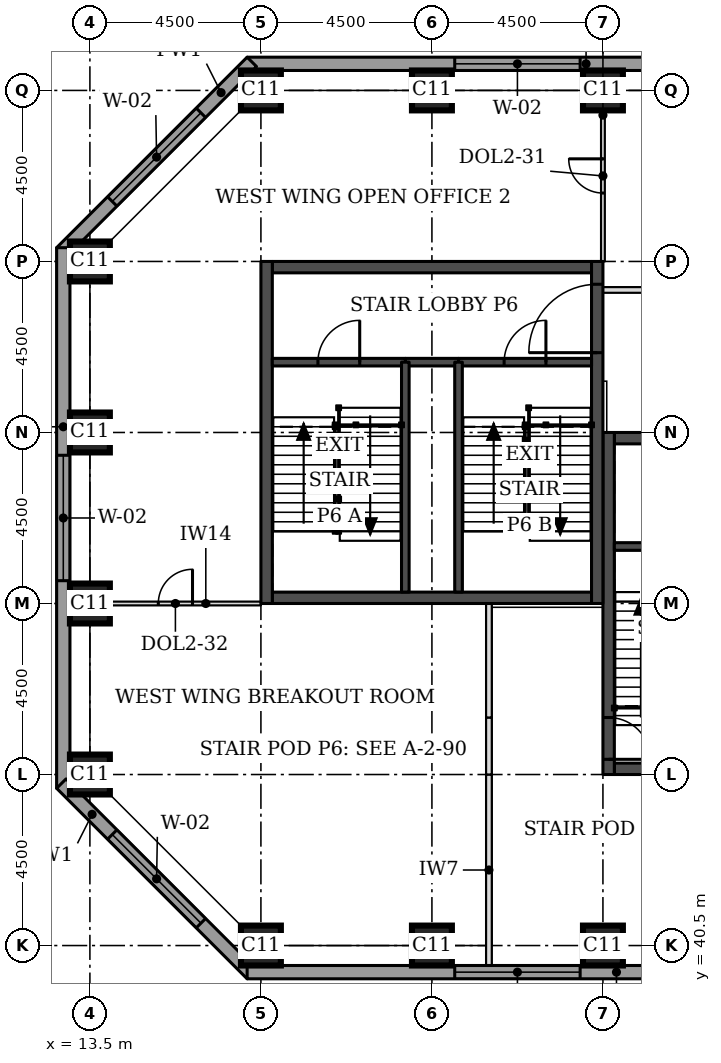
"""IFC4 building model, lengths in metres.
Left out: names, types, materials, properties, quantities, classifications, styles, units other than length and angle.
Written with IfcOpenShell. Run it as: python <this file> out.ifc"""

import sys

from ifc_helpers import new_model, si_unit, direction, frame, frame_2d, origin, origin_2d, place, context, subcontext, project, spatial, rectangle, extrude, element, fill, save


model = new_model("IFC4")
c1 = context("Model", 3, precision=1e-05, world=origin(), true_north=direction((0.0, 1.0)))
c2 = subcontext(c1, "Body", "Model", "MODEL_VIEW")
j1 = project(units=[si_unit("LENGTHUNIT", "METRE"), si_unit("PLANEANGLEUNIT", "RADIAN")], contexts=[c1])
p1 = place(None, origin())
s1 = spatial("IfcSite", under=j1, at=p1, CompositionType="ELEMENT")
p2 = place(p1, origin())
s2 = spatial("IfcBuilding", under=s1, at=p2, CompositionType="ELEMENT")
p3 = place(p2, frame((0.0, 0.0, 86.3)))
s3 = spatial("IfcBuildingStorey", under=s2, at=p3, CompositionType="ELEMENT", Elevation=86.3)
for number, where, z_axis, x_axis in (
    (1, (18.0, 40.5, 0.0), (0.0, 0.0, 1.0), (1.0, 0.0, 0.0)),
    (2, (22.5, 40.5, 0.0), (0.0, 0.0, 1.0), (1.0, 0.0, 0.0)),
    (3, (27.0, 40.5, 0.0), (0.0, 0.0, 1.0), (1.0, 0.0, 0.0)),
    (4, (13.5, 45.0, 0.0), (0.0, 0.0, 1.0), (1.0, 0.0, 0.0)),
    (5, (13.5, 49.5, 0.0), (0.0, 0.0, 1.0), (1.0, 0.0, 0.0)),
    (6, (13.5, 54.0, 0.0), (0.0, 0.0, 1.0), (1.0, 0.0, 0.0)),
    (7, (13.5, 58.5, 0.0), (0.0, 0.0, 1.0), (1.0, 0.0, 0.0)),
    (8, (18.0, 63.0, 0.0), (0.0, 0.0, 1.0), (1.0, 0.0, 0.0)),
    (9, (22.5, 63.0, 0.0), (0.0, 0.0, 1.0), (1.0, 0.0, 0.0)),
    (10, (27.0, 63.0, 0.0), (0.0, 0.0, 1.0), (1.0, 0.0, 0.0)),
):
    element("IfcColumn", number, at=place(p3, frame(where, z_axis=z_axis, x_axis=x_axis)), inside=s3, PredefinedType="COLUMN", context=c2, shape_type="SweptSolid", body=[
        extrude(rectangle(XDim=1.05, YDim=1.05, at=origin_2d()), origin(), (0.0, 0.0, 1.0), 3.7),
    ])
p4 = place(p3, frame((27.3, 45.15, 0.0), z_axis=(0.0, 0.0, 1.0), x_axis=(1.0, 0.0, 0.0)))
e11 = element("IfcWall", 11, at=p4, inside=s3, PredefinedType="SHEAR", context=c2, shape_type="SweptSolid", body=[
    extrude(rectangle(XDim=8.4, YDim=0.3, at=frame_2d((4.2, 0.0))), origin(), (0.0, 0.0, 1.0), 3.7),
])
p5 = place(p4, frame((5.2, 0.0, 0.0)))
e12 = element("IfcOpeningElement", 12, at=p5, cuts=e11, PredefinedType="OPENING", context=c2, shape_type="SweptSolid", body=[
    extrude(rectangle(XDim=1.0, YDim=2.1, at=frame_2d((0.5, 1.05))), frame((0.0, 0.16, 0.0), z_axis=(0.0, -1.0, 0.0), x_axis=(1.0, 0.0, 0.0)), (0.0, 0.0, 1.0), 0.32),
])
p6 = place(p3, frame((27.3, 53.85, 0.0), z_axis=(0.0, 0.0, 1.0), x_axis=(1.0, 0.0, 0.0)))
e13 = element("IfcWall", 13, at=p6, inside=s3, PredefinedType="SHEAR", context=c2, shape_type="SweptSolid", body=[
    extrude(rectangle(XDim=8.4, YDim=0.3, at=frame_2d((4.2, 0.0))), origin(), (0.0, 0.0, 1.0), 3.7),
])
p7 = place(p6, frame((6.4, 0.0, 0.0)))
e14 = element("IfcOpeningElement", 14, at=p7, cuts=e13, PredefinedType="OPENING", context=c2, shape_type="SweptSolid", body=[
    extrude(rectangle(XDim=1.1, YDim=2.1, at=frame_2d((0.55, 1.05))), frame((0.0, 0.16, 0.0), z_axis=(0.0, -1.0, 0.0), x_axis=(1.0, 0.0, 0.0)), (0.0, 0.0, 1.0), 0.32),
])
p8 = place(p3, frame((27.15, 45.0, 0.0), z_axis=(0.0, 0.0, 1.0), x_axis=(0.0, 1.0, 0.0)))
e15 = element("IfcWall", 15, at=p8, inside=s3, PredefinedType="SHEAR", context=c2, shape_type="SweptSolid", body=[
    extrude(rectangle(XDim=9.0, YDim=0.3, at=frame_2d((4.5, 0.0))), origin(), (0.0, 0.0, 1.0), 3.7),
])
p9 = place(p8, frame((0.4, 0.0, 0.0)))
e16 = element("IfcOpeningElement", 16, at=p9, cuts=e15, PredefinedType="OPENING", context=c2, shape_type="SweptSolid", body=[
    extrude(rectangle(XDim=1.1, YDim=2.1, at=frame_2d((0.55, 1.05))), frame((0.0, 0.16, 0.0), z_axis=(0.0, -1.0, 0.0), x_axis=(1.0, 0.0, 0.0)), (0.0, 0.0, 1.0), 0.32),
])
for number, where, z_axis, x_axis in (
    (17, (18.3, 49.65, 0.0), (0.0, 0.0, 1.0), (1.0, 0.0, 0.0)),
    (18, (18.3, 58.35, 0.0), (0.0, 0.0, 1.0), (1.0, 0.0, 0.0)),
):
    element("IfcWall", number, at=place(p3, frame(where, z_axis=z_axis, x_axis=x_axis)), inside=s3, PredefinedType="SHEAR", context=c2, shape_type="SweptSolid", body=[
        extrude(rectangle(XDim=8.4, YDim=0.3, at=frame_2d((4.2, 0.0))), origin(), (0.0, 0.0, 1.0), 3.7),
    ])
p10 = place(p3, frame((18.15, 49.5, 0.0), z_axis=(0.0, 0.0, 1.0), x_axis=(0.0, 1.0, 0.0)))
e19 = element("IfcWall", 19, at=p10, inside=s3, PredefinedType="SHEAR", context=c2, shape_type="SweptSolid", body=[
    extrude(rectangle(XDim=9.0, YDim=0.3, at=frame_2d((4.5, 0.0))), origin(), (0.0, 0.0, 1.0), 3.7),
])
p11 = place(p3, frame((26.85, 49.5, 0.0), z_axis=(0.0, 0.0, 1.0), x_axis=(0.0, 1.0, 0.0)))
e20 = element("IfcWall", 20, at=p11, inside=s3, PredefinedType="SHEAR", context=c2, shape_type="SweptSolid", body=[
    extrude(rectangle(XDim=9.0, YDim=0.3, at=frame_2d((4.5, 0.0))), origin(), (0.0, 0.0, 1.0), 3.7),
])
p12 = place(p11, frame((6.6, 0.0, 0.0)))
e21 = element("IfcOpeningElement", 21, at=p12, cuts=e20, PredefinedType="OPENING", context=c2, shape_type="SweptSolid", body=[
    extrude(rectangle(XDim=1.8, YDim=2.1, at=frame_2d((0.9, 1.05))), frame((0.0, 0.16, 0.0), z_axis=(0.0, -1.0, 0.0), x_axis=(1.0, 0.0, 0.0)), (0.0, 0.0, 1.0), 0.32),
])
p13 = place(p3, frame((35.475, 63.7, 0.0), z_axis=(0.0, 0.0, 1.0), x_axis=(-1.0, 0.0, 0.0)))
e22 = element("IfcWall", 22, at=p13, inside=s3, PredefinedType="STANDARD", context=c2, shape_type="SweptSolid", body=[
    extrude(rectangle(XDim=17.837, YDim=0.35, at=frame_2d((8.919, 0.0))), origin(), (0.0, 0.0, 1.0), 3.525),
])
p14 = place(p13, frame((0.5, 0.0, 0.9)))
e23 = element("IfcOpeningElement", 23, at=p14, cuts=e22, PredefinedType="OPENING", context=c2, shape_type="SweptSolid", body=[
    extrude(rectangle(XDim=3.3, YDim=1.9, at=frame_2d((1.65, 0.95))), frame((0.0, 0.185, 0.0), z_axis=(0.0, -1.0, 0.0), x_axis=(1.0, 0.0, 0.0)), (0.0, 0.0, 1.0), 0.37),
])
p15 = place(p13, frame((9.075, 0.0, 0.9)))
e24 = element("IfcOpeningElement", 24, at=p15, cuts=e22, PredefinedType="OPENING", context=c2, shape_type="SweptSolid", body=[
    extrude(rectangle(XDim=3.3, YDim=1.9, at=frame_2d((1.65, 0.95))), frame((0.0, 0.185, 0.0), z_axis=(0.0, -1.0, 0.0), x_axis=(1.0, 0.0, 0.0)), (0.0, 0.0, 1.0), 0.37),
])
p16 = place(p3, frame((17.761, 63.751, 0.0), z_axis=(0.0, 0.0, 1.0), x_axis=(-0.707106781187, -0.707106781187, 0.0)))
e25 = element("IfcWall", 25, at=p16, inside=s3, PredefinedType="STANDARD", context=c2, shape_type="SweptSolid", body=[
    extrude(rectangle(XDim=7.089, YDim=0.35, at=frame_2d((3.544, 0.0))), origin(), (0.0, 0.0, 1.0), 3.525),
])
p17 = place(p16, frame((1.894, 0.0, 0.9)))
e26 = element("IfcOpeningElement", 26, at=p17, cuts=e25, PredefinedType="OPENING", context=c2, shape_type="SweptSolid", body=[
    extrude(rectangle(XDim=3.3, YDim=1.9, at=frame_2d((1.65, 0.95))), frame((0.0, 0.185, 0.0), z_axis=(0.0, -1.0, 0.0), x_axis=(1.0, 0.0, 0.0)), (0.0, 0.0, 1.0), 0.37),
])
p18 = place(p3, frame((12.8, 58.862, 0.0), z_axis=(0.0, 0.0, 1.0), x_axis=(0.0, -1.0, 0.0)))
e27 = element("IfcWall", 27, at=p18, inside=s3, PredefinedType="STANDARD", context=c2, shape_type="SweptSolid", body=[
    extrude(rectangle(XDim=14.225, YDim=0.35, at=frame_2d((7.112, 0.0))), origin(), (0.0, 0.0, 1.0), 3.525),
])
p19 = place(p18, frame((5.462, 0.0, 0.9)))
e28 = element("IfcOpeningElement", 28, at=p19, cuts=e27, PredefinedType="OPENING", context=c2, shape_type="SweptSolid", body=[
    extrude(rectangle(XDim=3.3, YDim=1.9, at=frame_2d((1.65, 0.95))), frame((0.0, 0.185, 0.0), z_axis=(0.0, -1.0, 0.0), x_axis=(1.0, 0.0, 0.0)), (0.0, 0.0, 1.0), 0.37),
])
p20 = place(p3, frame((12.749, 44.761, 0.0), z_axis=(0.0, 0.0, 1.0), x_axis=(0.707106781187, -0.707106781187, 0.0)))
e29 = element("IfcWall", 29, at=p20, inside=s3, PredefinedType="STANDARD", context=c2, shape_type="SweptSolid", body=[
    extrude(rectangle(XDim=7.089, YDim=0.35, at=frame_2d((3.544, 0.0))), origin(), (0.0, 0.0, 1.0), 3.525),
])
p21 = place(p20, frame((1.894, 0.0, 0.9)))
e30 = element("IfcOpeningElement", 30, at=p21, cuts=e29, PredefinedType="OPENING", context=c2, shape_type="SweptSolid", body=[
    extrude(rectangle(XDim=3.3, YDim=1.9, at=frame_2d((1.65, 0.95))), frame((0.0, 0.185, 0.0), z_axis=(0.0, -1.0, 0.0), x_axis=(1.0, 0.0, 0.0)), (0.0, 0.0, 1.0), 0.37),
])
p22 = place(p3, frame((17.638, 39.8, 0.0), z_axis=(0.0, 0.0, 1.0), x_axis=(1.0, 0.0, 0.0)))
e31 = element("IfcWall", 31, at=p22, inside=s3, PredefinedType="STANDARD", context=c2, shape_type="SweptSolid", body=[
    extrude(rectangle(XDim=17.837, YDim=0.35, at=frame_2d((8.919, 0.0))), origin(), (0.0, 0.0, 1.0), 3.525),
])
p23 = place(p22, frame((5.462, 0.0, 0.9)))
e32 = element("IfcOpeningElement", 32, at=p23, cuts=e31, PredefinedType="OPENING", context=c2, shape_type="SweptSolid", body=[
    extrude(rectangle(XDim=3.3, YDim=1.9, at=frame_2d((1.65, 0.95))), frame((0.0, 0.185, 0.0), z_axis=(0.0, -1.0, 0.0), x_axis=(1.0, 0.0, 0.0)), (0.0, 0.0, 1.0), 0.37),
])
p24 = place(p22, frame((14.037, 0.0, 0.9)))
e33 = element("IfcOpeningElement", 33, at=p24, cuts=e31, PredefinedType="OPENING", context=c2, shape_type="SweptSolid", body=[
    extrude(rectangle(XDim=3.3, YDim=1.9, at=frame_2d((1.65, 0.95))), frame((0.0, 0.185, 0.0), z_axis=(0.0, -1.0, 0.0), x_axis=(1.0, 0.0, 0.0)), (0.0, 0.0, 1.0), 0.37),
])
p25 = place(p3, frame((24.0, 39.975, 0.0), z_axis=(0.0, 0.0, 1.0), x_axis=(0.0, 1.0, 0.0)))
e34 = element("IfcWall", 34, at=p25, inside=s3, PredefinedType="PARTITIONING", context=c2, shape_type="SweptSolid", body=[
    extrude(rectangle(XDim=5.025, YDim=0.15, at=frame_2d((2.512, 0.0))), origin(), (0.0, 0.0, 1.0), 3.55),
])
p26 = place(p3, frame((24.0, 45.0, 0.0), z_axis=(0.0, 0.0, 1.0), x_axis=(0.0, 1.0, 0.0)))
e35 = element("IfcWall", 35, at=p26, inside=s3, PredefinedType="PARTITIONING", context=c2, shape_type="SweptSolid", body=[
    extrude(rectangle(XDim=1.5, YDim=0.15, at=frame_2d((0.75, 0.0))), origin(), (0.0, 0.0, 1.0), 3.55),
])
p27 = place(p3, frame((24.0, 46.5, 0.0), z_axis=(0.0, 0.0, 1.0), x_axis=(0.0, 1.0, 0.0)))
e36 = element("IfcWall", 36, at=p27, inside=s3, PredefinedType="PARTITIONING", context=c2, shape_type="SweptSolid", body=[
    extrude(rectangle(XDim=3.0, YDim=0.15, at=frame_2d((1.5, 0.0))), origin(), (0.0, 0.0, 1.0), 3.55),
])
p28 = place(p3, frame((27.0, 63.0, 0.0), z_axis=(0.0, 0.0, 1.0), x_axis=(0.0, -1.0, 0.0)))
e37 = element("IfcWall", 37, at=p28, inside=s3, PredefinedType="PARTITIONING", context=c2, shape_type="SweptSolid", body=[
    extrude(rectangle(XDim=4.5, YDim=0.1, at=frame_2d((2.25, 0.0))), origin(), (0.0, 0.0, 1.0), 3.55),
])
p29 = place(p28, frame((1.8, 0.0, 0.0)))
e38 = element("IfcOpeningElement", 38, at=p29, cuts=e37, PredefinedType="OPENING", context=c2, shape_type="SweptSolid", body=[
    extrude(rectangle(XDim=0.9, YDim=2.1, at=frame_2d((0.45, 1.05))), frame((0.0, 0.06, 0.0), z_axis=(0.0, -1.0, 0.0), x_axis=(1.0, 0.0, 0.0)), (0.0, 0.0, 1.0), 0.12),
])
p30 = place(p3, frame((13.5, 49.5, 0.0), z_axis=(0.0, 0.0, 1.0), x_axis=(1.0, 0.0, 0.0)))
e39 = element("IfcWall", 39, at=p30, inside=s3, PredefinedType="PARTITIONING", context=c2, shape_type="SweptSolid", body=[
    extrude(rectangle(XDim=4.5, YDim=0.1, at=frame_2d((2.25, 0.0))), origin(), (0.0, 0.0, 1.0), 3.55),
])
p31 = place(p30, frame((1.8, 0.0, 0.0)))
e40 = element("IfcOpeningElement", 40, at=p31, cuts=e39, PredefinedType="OPENING", context=c2, shape_type="SweptSolid", body=[
    extrude(rectangle(XDim=0.9, YDim=2.1, at=frame_2d((0.45, 1.05))), frame((0.0, 0.06, 0.0), z_axis=(0.0, -1.0, 0.0), x_axis=(1.0, 0.0, 0.0)), (0.0, 0.0, 1.0), 0.12),
])
p32 = place(p3, frame((27.0, 57.75, 0.0), z_axis=(0.0, 0.0, 1.0), x_axis=(1.0, 0.0, 0.0)))
e41 = element("IfcWall", 41, at=p32, inside=s3, PredefinedType="PARTITIONING", context=c2, shape_type="SweptSolid", body=[
    extrude(rectangle(XDim=2.4, YDim=0.15, at=frame_2d((1.2, 0.0))), origin(), (0.0, 0.0, 1.0), 3.55),
])
p33 = place(p3, frame((27.3, 51.0, 0.0), z_axis=(0.0, 0.0, 1.0), x_axis=(1.0, 0.0, 0.0)))
e42 = element("IfcWall", 42, at=p33, inside=s3, PredefinedType="SOLIDWALL", context=c2, shape_type="SweptSolid", body=[
    extrude(rectangle(XDim=3.0, YDim=0.2, at=frame_2d((1.5, 0.0))), origin(), (0.0, 0.0, 1.0), 3.55),
])
p34 = place(p3, frame((21.8, 55.85, 0.0), z_axis=(0.0, 0.0, 1.0), x_axis=(1.0, 0.0, 0.0)))
e43 = element("IfcWall", 43, at=p34, inside=s3, PredefinedType="SOLIDWALL", context=c2, shape_type="SweptSolid", body=[
    extrude(rectangle(XDim=1.4, YDim=0.2, at=frame_2d((0.7, 0.0))), origin(), (0.0, 0.0, 1.0), 3.55),
])
p35 = place(p3, frame((18.3, 55.85, 0.0), z_axis=(0.0, 0.0, 1.0), x_axis=(1.0, 0.0, 0.0)))
e44 = element("IfcWall", 44, at=p35, inside=s3, PredefinedType="SOLIDWALL", context=c2, shape_type="SweptSolid", body=[
    extrude(rectangle(XDim=3.5, YDim=0.2, at=frame_2d((1.75, 0.0))), origin(), (0.0, 0.0, 1.0), 3.55),
])
p36 = place(p35, frame((1.2, 0.0, 0.0)))
e45 = element("IfcOpeningElement", 45, at=p36, cuts=e44, PredefinedType="OPENING", context=c2, shape_type="SweptSolid", body=[
    extrude(rectangle(XDim=1.1, YDim=2.1, at=frame_2d((0.55, 1.05))), frame((0.0, 0.11, 0.0), z_axis=(0.0, -1.0, 0.0), x_axis=(1.0, 0.0, 0.0)), (0.0, 0.0, 1.0), 0.22),
])
p37 = place(p3, frame((23.2, 55.85, 0.0), z_axis=(0.0, 0.0, 1.0), x_axis=(1.0, 0.0, 0.0)))
e46 = element("IfcWall", 46, at=p37, inside=s3, PredefinedType="SOLIDWALL", context=c2, shape_type="SweptSolid", body=[
    extrude(rectangle(XDim=3.5, YDim=0.2, at=frame_2d((1.75, 0.0))), origin(), (0.0, 0.0, 1.0), 3.55),
])
p38 = place(p37, frame((1.2, 0.0, 0.0)))
e47 = element("IfcOpeningElement", 47, at=p38, cuts=e46, PredefinedType="OPENING", context=c2, shape_type="SweptSolid", body=[
    extrude(rectangle(XDim=1.1, YDim=2.1, at=frame_2d((0.55, 1.05))), frame((0.0, 0.11, 0.0), z_axis=(0.0, -1.0, 0.0), x_axis=(1.0, 0.0, 0.0)), (0.0, 0.0, 1.0), 0.22),
])
for number, where, z_axis, x_axis in (
    (48, (21.8, 49.8, 0.0), (0.0, 0.0, 1.0), (0.0, 1.0, 0.0)),
    (49, (23.2, 49.8, 0.0), (0.0, 0.0, 1.0), (0.0, 1.0, 0.0)),
):
    element("IfcWall", number, at=place(p3, frame(where, z_axis=z_axis, x_axis=x_axis)), inside=s3, PredefinedType="SOLIDWALL", context=c2, shape_type="SweptSolid", body=[
        extrude(rectangle(XDim=6.05, YDim=0.2, at=frame_2d((3.025, 0.0))), origin(), (0.0, 0.0, 1.0), 3.55),
    ])
p39 = place(p15, origin())
e50 = element("IfcWindow", 50, at=p39, inside=s3, PartitioningType="SINGLE_PANEL", PredefinedType="WINDOW", context=c2, shape_type="SweptSolid", body=[
    extrude(rectangle(XDim=3.3, YDim=1.9, at=frame_2d((1.65, 0.95))), frame((0.0, 0.085, 0.0), z_axis=(0.0, -1.0, 0.0), x_axis=(1.0, 0.0, 0.0)), (0.0, 0.0, 1.0), 0.06),
])
fill(e24, e50)
p40 = place(p17, origin())
e51 = element("IfcWindow", 51, at=p40, inside=s3, PartitioningType="SINGLE_PANEL", PredefinedType="WINDOW", context=c2, shape_type="SweptSolid", body=[
    extrude(rectangle(XDim=3.3, YDim=1.9, at=frame_2d((1.65, 0.95))), frame((0.0, 0.085, 0.0), z_axis=(0.0, -1.0, 0.0), x_axis=(1.0, 0.0, 0.0)), (0.0, 0.0, 1.0), 0.06),
])
fill(e26, e51)
p41 = place(p19, origin())
e52 = element("IfcWindow", 52, at=p41, inside=s3, PartitioningType="SINGLE_PANEL", PredefinedType="WINDOW", context=c2, shape_type="SweptSolid", body=[
    extrude(rectangle(XDim=3.3, YDim=1.9, at=frame_2d((1.65, 0.95))), frame((0.0, 0.085, 0.0), z_axis=(0.0, -1.0, 0.0), x_axis=(1.0, 0.0, 0.0)), (0.0, 0.0, 1.0), 0.06),
])
fill(e28, e52)
p42 = place(p21, origin())
e53 = element("IfcWindow", 53, at=p42, inside=s3, PartitioningType="SINGLE_PANEL", PredefinedType="WINDOW", context=c2, shape_type="SweptSolid", body=[
    extrude(rectangle(XDim=3.3, YDim=1.9, at=frame_2d((1.65, 0.95))), frame((0.0, 0.085, 0.0), z_axis=(0.0, -1.0, 0.0), x_axis=(1.0, 0.0, 0.0)), (0.0, 0.0, 1.0), 0.06),
])
fill(e30, e53)
p43 = place(p23, origin())
e54 = element("IfcWindow", 54, at=p43, inside=s3, PartitioningType="SINGLE_PANEL", PredefinedType="WINDOW", context=c2, shape_type="SweptSolid", body=[
    extrude(rectangle(XDim=3.3, YDim=1.9, at=frame_2d((1.65, 0.95))), frame((0.0, 0.085, 0.0), z_axis=(0.0, -1.0, 0.0), x_axis=(1.0, 0.0, 0.0)), (0.0, 0.0, 1.0), 0.06),
])
fill(e32, e54)
p44 = place(p29, frame((0.9, 0.0, 0.0), z_axis=(0.0, 0.0, 1.0), x_axis=(-1.0, 0.0, 0.0)))
e55 = element("IfcDoor", 55, at=p44, inside=s3, OperationType="SINGLE_SWING_RIGHT", PredefinedType="DOOR", context=c2, shape_type="SweptSolid", body=[
    extrude(rectangle(XDim=0.9, YDim=2.1, at=frame_2d((0.45, 1.05))), frame((0.0, 0.025, 0.0), z_axis=(0.0, -1.0, 0.0), x_axis=(1.0, 0.0, 0.0)), (0.0, 0.0, 1.0), 0.05),
])
fill(e38, e55)
p45 = place(p31, origin())
e56 = element("IfcDoor", 56, at=p45, inside=s3, OperationType="SINGLE_SWING_RIGHT", PredefinedType="DOOR", context=c2, shape_type="SweptSolid", body=[
    extrude(rectangle(XDim=0.9, YDim=2.1, at=frame_2d((0.45, 1.05))), frame((0.0, 0.025, 0.0), z_axis=(0.0, -1.0, 0.0), x_axis=(1.0, 0.0, 0.0)), (0.0, 0.0, 1.0), 0.05),
])
fill(e40, e56)
p46 = place(p9, frame((1.1, 0.0, 0.0), z_axis=(0.0, 0.0, 1.0), x_axis=(-1.0, 0.0, 0.0)))
e57 = element("IfcDoor", 57, at=p46, inside=s3, OperationType="SINGLE_SWING_RIGHT", PredefinedType="DOOR", context=c2, shape_type="SweptSolid", body=[
    extrude(rectangle(XDim=1.1, YDim=2.1, at=frame_2d((0.55, 1.05))), frame((0.0, 0.025, 0.0), z_axis=(0.0, -1.0, 0.0), x_axis=(1.0, 0.0, 0.0)), (0.0, 0.0, 1.0), 0.05),
])
fill(e16, e57)
p47 = place(p36, origin())
e58 = element("IfcDoor", 58, at=p47, inside=s3, OperationType="SINGLE_SWING_RIGHT", PredefinedType="DOOR", context=c2, shape_type="SweptSolid", body=[
    extrude(rectangle(XDim=1.1, YDim=2.1, at=frame_2d((0.55, 1.05))), frame((0.0, 0.025, 0.0), z_axis=(0.0, -1.0, 0.0), x_axis=(1.0, 0.0, 0.0)), (0.0, 0.0, 1.0), 0.05),
])
fill(e45, e58)
p48 = place(p38, origin())
e59 = element("IfcDoor", 59, at=p48, inside=s3, OperationType="SINGLE_SWING_RIGHT", PredefinedType="DOOR", context=c2, shape_type="SweptSolid", body=[
    extrude(rectangle(XDim=1.1, YDim=2.1, at=frame_2d((0.55, 1.05))), frame((0.0, 0.025, 0.0), z_axis=(0.0, -1.0, 0.0), x_axis=(1.0, 0.0, 0.0)), (0.0, 0.0, 1.0), 0.05),
])
fill(e47, e59)
p49 = place(p12, origin())
e60 = element("IfcDoor", 60, at=p49, inside=s3, OperationType="SINGLE_SWING_LEFT", PredefinedType="DOOR", context=c2, shape_type="SweptSolid", body=[
    extrude(rectangle(XDim=1.8, YDim=2.1, at=frame_2d((0.9, 1.05))), frame((0.0, 0.025, 0.0), z_axis=(0.0, -1.0, 0.0), x_axis=(1.0, 0.0, 0.0)), (0.0, 0.0, 1.0), 0.05),
])
fill(e21, e60)
save(model, sys.argv[1])
